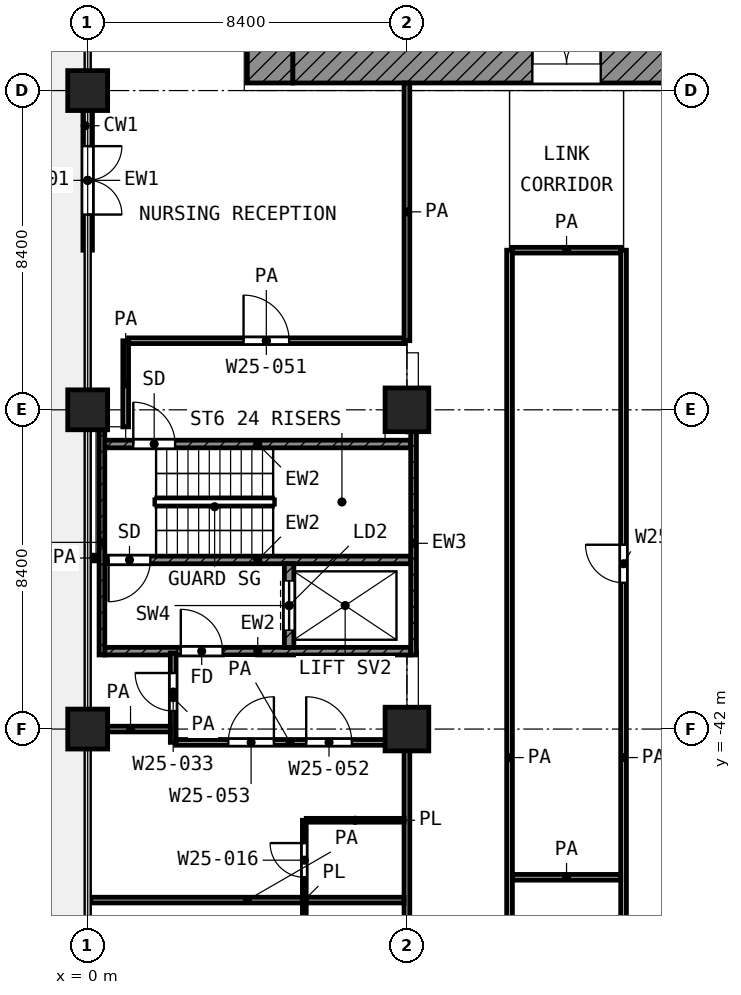
"""IFC4 building model, lengths in metres.
Left out: names, types, materials, properties, quantities, classifications, styles, units other than length and angle.
Written with IfcOpenShell. Run it as: python <this file> out.ifc"""

import sys

from ifc_helpers import new_model, si_unit, direction, frame, frame_2d, origin, origin_2d, place, context, subcontext, project, spatial, rectangle, extrude, element, fill, save


model = new_model("IFC4")
c1 = context("Model", 3, precision=1e-05, world=origin(), true_north=direction((0.0, 1.0)))
c2 = subcontext(c1, "Body", "Model", "MODEL_VIEW")
j1 = project(units=[si_unit("LENGTHUNIT", "METRE"), si_unit("PLANEANGLEUNIT", "RADIAN")], contexts=[c1])
p1 = place(None, origin())
s1 = spatial("IfcSite", under=j1, at=p1, CompositionType="ELEMENT")
p2 = place(p1, origin())
s2 = spatial("IfcBuilding", under=s1, at=p2, CompositionType="ELEMENT")
p3 = place(p2, frame((0.0, 0.0, 132.4)))
s3 = spatial("IfcBuildingStorey", under=s2, at=p3, CompositionType="ELEMENT", Elevation=132.4)
for number, where, z_axis, x_axis in (
    (1, (0.0, -25.2, 0.0), (0.0, 0.0, 1.0), (1.0, 0.0, 0.0)),
    (2, (0.0, -33.6, 0.0), (0.0, 0.0, 1.0), (1.0, 0.0, 0.0)),
):
    element("IfcColumn", number, at=place(p3, frame(where, z_axis=z_axis, x_axis=x_axis)), inside=s3, PredefinedType="COLUMN", context=c2, shape_type="SweptSolid", body=[
        extrude(rectangle(XDim=1.05, YDim=1.05, at=origin_2d()), origin(), (0.0, 0.0, 1.0), 4.2),
    ])
p4 = place(p3, frame((8.4, -33.6, 0.0), z_axis=(0.0, 0.0, 1.0), x_axis=(1.0, 0.0, 0.0)))
e3 = element("IfcColumn", 3, at=p4, inside=s3, PredefinedType="COLUMN", context=c2, shape_type="SweptSolid", body=[
    extrude(rectangle(XDim=1.15, YDim=1.15, at=origin_2d()), origin(), (0.0, 0.0, 1.0), 4.2),
])
p5 = place(p3, frame((0.0, -42.0, 0.0), z_axis=(0.0, 0.0, 1.0), x_axis=(1.0, 0.0, 0.0)))
e4 = element("IfcColumn", 4, at=p5, inside=s3, PredefinedType="COLUMN", context=c2, shape_type="SweptSolid", body=[
    extrude(rectangle(XDim=1.05, YDim=1.05, at=origin_2d()), origin(), (0.0, 0.0, 1.0), 4.2),
])
p6 = place(p3, frame((8.4, -42.0, 0.0), z_axis=(0.0, 0.0, 1.0), x_axis=(1.0, 0.0, 0.0)))
e5 = element("IfcColumn", 5, at=p6, inside=s3, PredefinedType="COLUMN", context=c2, shape_type="SweptSolid", body=[
    extrude(rectangle(XDim=1.15, YDim=1.15, at=origin_2d()), origin(), (0.0, 0.0, 1.0), 4.2),
])
p7 = place(p3, frame((0.0, -25.725, 0.0), z_axis=(0.0, 0.0, 1.0), x_axis=(0.0, -1.0, 0.0)))
e6 = element("IfcWall", 6, at=p7, inside=s3, PredefinedType="SOLIDWALL", context=c2, shape_type="SweptSolid", body=[
    extrude(rectangle(XDim=3.675, YDim=0.25, at=frame_2d((1.837, 0.0))), origin(), (0.0, 0.0, 1.0), 3.48),
])
p8 = place(p7, frame((0.938, 0.0, 0.0)))
e7 = element("IfcOpeningElement", 7, at=p8, cuts=e6, PredefinedType="OPENING", context=c2, shape_type="SweptSolid", body=[
    extrude(rectangle(XDim=1.8, YDim=2.1, at=frame_2d((0.9, 1.05))), frame((0.0, 0.135, 0.0), z_axis=(0.0, -1.0, 0.0), x_axis=(1.0, 0.0, 0.0)), (0.0, 0.0, 1.0), 0.27),
])
p9 = place(p3, frame((4.8, -25.0, 0.0), z_axis=(0.0, 0.0, 1.0), x_axis=(0.0, 1.0, 0.0)))
e8 = element("IfcWall", 8, at=p9, inside=s3, PredefinedType="SHEAR", context=c2, shape_type="SweptSolid", body=[
    extrude(rectangle(XDim=19.6, YDim=1.2, at=frame_2d((9.8, 0.0))), origin(), (0.0, 0.0, 1.0), 3.6),
])
p10 = place(p9, frame((11.45, 0.0, 0.0)))
e9 = element("IfcOpeningElement", 9, at=p10, cuts=e8, PredefinedType="OPENING", context=c2, shape_type="SweptSolid", body=[
    extrude(rectangle(XDim=1.1, YDim=2.1, at=frame_2d((0.55, 1.05))), frame((0.0, 0.61, 0.0), z_axis=(0.0, -1.0, 0.0), x_axis=(1.0, 0.0, 0.0)), (0.0, 0.0, 1.0), 1.22),
])
p11 = place(p9, frame((2.15, 0.0, 0.0)))
e10 = element("IfcOpeningElement", 10, at=p11, cuts=e8, PredefinedType="OPENING", context=c2, shape_type="SweptSolid", body=[
    extrude(rectangle(XDim=1.1, YDim=2.1, at=frame_2d((0.55, 1.05))), frame((0.0, 0.61, 0.0), z_axis=(0.0, -1.0, 0.0), x_axis=(1.0, 0.0, 0.0)), (0.0, 0.0, 1.0), 1.22),
])
p12 = place(p3, frame((5.4, -24.5, 0.0), z_axis=(0.0, 0.0, 1.0), x_axis=(1.0, 0.0, 0.0)))
e11 = element("IfcWall", 11, at=p12, inside=s3, PredefinedType="SHEAR", context=c2, shape_type="SweptSolid", body=[
    extrude(rectangle(XDim=18.6, YDim=1.0, at=frame_2d((9.3, 0.0))), origin(), (0.0, 0.0, 1.0), 3.6),
])
p13 = place(p12, frame((6.3, 0.0, 0.0)))
e12 = element("IfcOpeningElement", 12, at=p13, cuts=e11, PredefinedType="OPENING", context=c2, shape_type="SweptSolid", body=[
    extrude(rectangle(XDim=1.8, YDim=2.1, at=frame_2d((0.9, 1.05))), frame((0.0, 0.51, 0.0), z_axis=(0.0, -1.0, 0.0), x_axis=(1.0, 0.0, 0.0)), (0.0, 0.0, 1.0), 1.02),
])
p14 = place(p3, frame((0.375, -40.05, 0.0), z_axis=(0.0, 0.0, 1.0), x_axis=(0.0, 1.0, 0.0)))
e13 = element("IfcWall", 13, at=p14, inside=s3, PredefinedType="SHEAR", context=c2, shape_type="SweptSolid", body=[
    extrude(rectangle(XDim=5.925, YDim=0.15, at=frame_2d((2.962, 0.0))), origin(), (0.0, 0.0, 1.0), 3.6),
])
p15 = place(p3, frame((8.575, -40.05, 0.0), z_axis=(0.0, 0.0, 1.0), x_axis=(0.0, 1.0, 0.0)))
e14 = element("IfcWall", 14, at=p15, inside=s3, PredefinedType="SHEAR", context=c2, shape_type="SweptSolid", body=[
    extrude(rectangle(XDim=5.875, YDim=0.15, at=frame_2d((2.938, 0.0))), origin(), (0.0, 0.0, 1.0), 3.6),
])
p16 = place(p3, frame((0.45, -34.5, 0.0), z_axis=(0.0, 0.0, 1.0), x_axis=(1.0, 0.0, 0.0)))
e15 = element("IfcWall", 15, at=p16, inside=s3, PredefinedType="SHEAR", context=c2, shape_type="SweptSolid", body=[
    extrude(rectangle(XDim=8.05, YDim=0.2, at=frame_2d((4.025, 0.0))), origin(), (0.0, 0.0, 1.0), 3.6),
])
p17 = place(p16, frame((0.75, 0.0, 0.0)))
e16 = element("IfcOpeningElement", 16, at=p17, cuts=e15, PredefinedType="OPENING", context=c2, shape_type="SweptSolid", body=[
    extrude(rectangle(XDim=1.1, YDim=2.1, at=frame_2d((0.55, 1.05))), frame((0.0, 0.11, 0.0), z_axis=(0.0, -1.0, 0.0), x_axis=(1.0, 0.0, 0.0)), (0.0, 0.0, 1.0), 0.22),
])
p18 = place(p3, frame((0.45, -37.55, 0.0), z_axis=(0.0, 0.0, 1.0), x_axis=(1.0, 0.0, 0.0)))
e17 = element("IfcWall", 17, at=p18, inside=s3, PredefinedType="SHEAR", context=c2, shape_type="SweptSolid", body=[
    extrude(rectangle(XDim=8.05, YDim=0.2, at=frame_2d((4.025, 0.0))), origin(), (0.0, 0.0, 1.0), 3.6),
])
p19 = place(p18, frame((0.1, 0.0, 0.0)))
e18 = element("IfcOpeningElement", 18, at=p19, cuts=e17, PredefinedType="OPENING", context=c2, shape_type="SweptSolid", body=[
    extrude(rectangle(XDim=1.1, YDim=2.1, at=frame_2d((0.55, 1.05))), frame((0.0, 0.11, 0.0), z_axis=(0.0, -1.0, 0.0), x_axis=(1.0, 0.0, 0.0)), (0.0, 0.0, 1.0), 0.22),
])
p20 = place(p3, frame((0.45, -39.95, 0.0), z_axis=(0.0, 0.0, 1.0), x_axis=(1.0, 0.0, 0.0)))
e19 = element("IfcWall", 19, at=p20, inside=s3, PredefinedType="SHEAR", context=c2, shape_type="SweptSolid", body=[
    extrude(rectangle(XDim=8.05, YDim=0.2, at=frame_2d((4.025, 0.0))), origin(), (0.0, 0.0, 1.0), 3.6),
])
p21 = place(p20, frame((2.0, 0.0, 0.0)))
e20 = element("IfcOpeningElement", 20, at=p21, cuts=e19, PredefinedType="OPENING", context=c2, shape_type="SweptSolid", body=[
    extrude(rectangle(XDim=1.1, YDim=2.1, at=frame_2d((0.55, 1.05))), frame((0.0, 0.11, 0.0), z_axis=(0.0, -1.0, 0.0), x_axis=(1.0, 0.0, 0.0)), (0.0, 0.0, 1.0), 0.22),
])
p22 = place(p3, frame((5.3, -39.85, 0.0), z_axis=(0.0, 0.0, 1.0), x_axis=(0.0, 1.0, 0.0)))
e21 = element("IfcWall", 21, at=p22, inside=s3, PredefinedType="SHEAR", context=c2, shape_type="SweptSolid", body=[
    extrude(rectangle(XDim=2.2, YDim=0.25, at=frame_2d((1.1, 0.0))), origin(), (0.0, 0.0, 1.0), 3.6),
])
p23 = place(p22, frame((0.45, 0.0, 0.0)))
e22 = element("IfcOpeningElement", 22, at=p23, cuts=e21, PredefinedType="OPENING", context=c2, shape_type="SweptSolid", body=[
    extrude(rectangle(XDim=1.3, YDim=2.1, at=frame_2d((0.65, 1.05))), frame((0.0, 0.135, 0.0), z_axis=(0.0, -1.0, 0.0), x_axis=(1.0, 0.0, 0.0)), (0.0, 0.0, 1.0), 0.27),
])
p24 = place(p3, frame((5.75, -44.4, 0.0), z_axis=(0.0, 0.0, 1.0), x_axis=(1.0, 0.0, 0.0)))
e23 = element("IfcWall", 23, at=p24, inside=s3, PredefinedType="PARTITIONING", context=c2, shape_type="SweptSolid", body=[
    extrude(rectangle(XDim=2.575, YDim=0.1, at=frame_2d((1.288, 0.0))), origin(), (0.0, 0.0, 1.0), 3.6),
])
p25 = place(p3, frame((5.7, -48.6, 0.0), z_axis=(0.0, 0.0, 1.0), x_axis=(0.0, 1.0, 0.0)))
e24 = element("IfcWall", 24, at=p25, inside=s3, PredefinedType="PARTITIONING", context=c2, shape_type="SweptSolid", body=[
    extrude(rectangle(XDim=4.2, YDim=0.1, at=frame_2d((2.1, 0.0))), origin(), (0.0, 0.0, 1.0), 3.6),
])
p26 = place(p25, frame((2.7, 0.0, 0.0)))
e25 = element("IfcOpeningElement", 25, at=p26, cuts=e24, PredefinedType="OPENING", context=c2, shape_type="SweptSolid", body=[
    extrude(rectangle(XDim=0.9, YDim=2.1, at=frame_2d((0.45, 1.05))), frame((0.0, 0.06, 0.0), z_axis=(0.0, -1.0, 0.0), x_axis=(1.0, 0.0, 0.0)), (0.0, 0.0, 1.0), 0.12),
])
p27 = place(p25, frame((0.6, 0.0, 0.0)))
e26 = element("IfcOpeningElement", 26, at=p27, cuts=e24, PredefinedType="OPENING", context=c2, shape_type="SweptSolid", body=[
    extrude(rectangle(XDim=0.9, YDim=2.1, at=frame_2d((0.45, 1.05))), frame((0.0, 0.06, 0.0), z_axis=(0.0, -1.0, 0.0), x_axis=(1.0, 0.0, 0.0)), (0.0, 0.0, 1.0), 0.12),
])
p28 = place(p3, frame((0.08, -46.5, 0.0), z_axis=(0.0, 0.0, 1.0), x_axis=(1.0, 0.0, 0.0)))
e27 = element("IfcWall", 27, at=p28, inside=s3, PredefinedType="PARTITIONING", context=c2, shape_type="SweptSolid", body=[
    extrude(rectangle(XDim=8.245, YDim=0.15, at=frame_2d((4.123, 0.0))), origin(), (0.0, 0.0, 1.0), 3.6),
])
p29 = place(p3, frame((11.175, -45.9, 0.0), z_axis=(0.0, 0.0, 1.0), x_axis=(1.0, 0.0, 0.0)))
e28 = element("IfcWall", 28, at=p29, inside=s3, PredefinedType="PARTITIONING", context=c2, shape_type="SweptSolid", body=[
    extrude(rectangle(XDim=2.85, YDim=0.15, at=frame_2d((1.425, 0.0))), origin(), (0.0, 0.0, 1.0), 3.6),
])
p30 = place(p3, frame((2.325, -42.35, 0.0), z_axis=(0.0, 0.0, 1.0), x_axis=(1.0, 0.0, 0.0)))
e29 = element("IfcWall", 29, at=p30, inside=s3, PredefinedType="PARTITIONING", context=c2, shape_type="SweptSolid", body=[
    extrude(rectangle(XDim=6.0, YDim=0.15, at=frame_2d((3.0, 0.0))), origin(), (0.0, 0.0, 1.0), 3.6),
])
p31 = place(p30, frame((3.425, 0.0, 0.0)))
e30 = element("IfcOpeningElement", 30, at=p31, cuts=e29, PredefinedType="OPENING", context=c2, shape_type="SweptSolid", body=[
    extrude(rectangle(XDim=1.2, YDim=2.1, at=frame_2d((0.6, 1.05))), frame((0.0, 0.085, 0.0), z_axis=(0.0, -1.0, 0.0), x_axis=(1.0, 0.0, 0.0)), (0.0, 0.0, 1.0), 0.17),
])
p32 = place(p30, frame((1.375, 0.0, 0.0)))
e31 = element("IfcOpeningElement", 31, at=p32, cuts=e29, PredefinedType="OPENING", context=c2, shape_type="SweptSolid", body=[
    extrude(rectangle(XDim=1.2, YDim=2.1, at=frame_2d((0.6, 1.05))), frame((0.0, 0.085, 0.0), z_axis=(0.0, -1.0, 0.0), x_axis=(1.0, 0.0, 0.0)), (0.0, 0.0, 1.0), 0.17),
])
p33 = place(p3, frame((0.08, -42.0, 0.0), z_axis=(0.0, 0.0, 1.0), x_axis=(1.0, 0.0, 0.0)))
e32 = element("IfcWall", 32, at=p33, inside=s3, PredefinedType="PARTITIONING", context=c2, shape_type="SweptSolid", body=[
    extrude(rectangle(XDim=2.095, YDim=0.15, at=frame_2d((1.047, 0.0))), origin(), (0.0, 0.0, 1.0), 3.6),
])
p34 = place(p3, frame((0.08, -37.5, 0.0), z_axis=(0.0, 0.0, 1.0), x_axis=(1.0, 0.0, 0.0)))
e33 = element("IfcWall", 33, at=p34, inside=s3, PredefinedType="PARTITIONING", context=c2, shape_type="SweptSolid", body=[
    extrude(rectangle(XDim=0.19, YDim=0.15, at=frame_2d((0.095, 0.0))), origin(), (0.0, 0.0, 1.0), 3.6),
])
p35 = place(p3, frame((1.076, -31.782, 0.0), z_axis=(0.0, 0.0, 1.0), x_axis=(1.0, 0.0, 0.0)))
e34 = element("IfcWall", 34, at=p35, inside=s3, PredefinedType="PARTITIONING", context=c2, shape_type="SweptSolid", body=[
    extrude(rectangle(XDim=7.249, YDim=0.15, at=frame_2d((3.625, 0.0))), origin(), (0.0, 0.0, 1.0), 3.6),
])
p36 = place(p35, frame((3.025, 0.0, 0.0)))
e35 = element("IfcOpeningElement", 35, at=p36, cuts=e34, PredefinedType="OPENING", context=c2, shape_type="SweptSolid", body=[
    extrude(rectangle(XDim=1.2, YDim=2.1, at=frame_2d((0.6, 1.05))), frame((0.0, 0.085, 0.0), z_axis=(0.0, -1.0, 0.0), x_axis=(1.0, 0.0, 0.0)), (0.0, 0.0, 1.0), 0.17),
])
p37 = place(p3, frame((11.175, -29.4, 0.0), z_axis=(0.0, 0.0, 1.0), x_axis=(1.0, 0.0, 0.0)))
e36 = element("IfcWall", 36, at=p37, inside=s3, PredefinedType="PARTITIONING", context=c2, shape_type="SweptSolid", body=[
    extrude(rectangle(XDim=2.85, YDim=0.15, at=frame_2d((1.425, 0.0))), origin(), (0.0, 0.0, 1.0), 3.6),
])
p38 = place(p3, frame((1.0, -34.048, 0.0), z_axis=(0.0, 0.0, 1.0), x_axis=(0.0, 1.0, 0.0)))
e37 = element("IfcWall", 37, at=p38, inside=s3, PredefinedType="PARTITIONING", context=c2, shape_type="SweptSolid", body=[
    extrude(rectangle(XDim=2.264, YDim=0.15, at=frame_2d((1.132, 0.0))), origin(), (0.0, 0.0, 1.0), 3.6),
])
p39 = place(p3, frame((2.25, -42.35, 0.0), z_axis=(0.0, 0.0, 1.0), x_axis=(0.0, 1.0, 0.0)))
e38 = element("IfcWall", 38, at=p39, inside=s3, PredefinedType="PARTITIONING", context=c2, shape_type="SweptSolid", body=[
    extrude(rectangle(XDim=2.35, YDim=0.15, at=frame_2d((1.175, 0.0))), origin(), (0.0, 0.0, 1.0), 3.6),
])
p40 = place(p39, frame((0.825, 0.0, 0.0)))
e39 = element("IfcOpeningElement", 39, at=p40, cuts=e38, PredefinedType="OPENING", context=c2, shape_type="SweptSolid", body=[
    extrude(rectangle(XDim=1.0, YDim=2.1, at=frame_2d((0.5, 1.05))), frame((0.0, 0.085, 0.0), z_axis=(0.0, -1.0, 0.0), x_axis=(1.0, 0.0, 0.0)), (0.0, 0.0, 1.0), 0.17),
])
p41 = place(p3, frame((8.4, -58.72, 0.0), z_axis=(0.0, 0.0, 1.0), x_axis=(0.0, 1.0, 0.0)))
e40 = element("IfcWall", 40, at=p41, inside=s3, PredefinedType="PARTITIONING", context=c2, shape_type="SweptSolid", body=[
    extrude(rectangle(XDim=16.37, YDim=0.15, at=frame_2d((8.185, 0.0))), origin(), (0.0, 0.0, 1.0), 2.7),
])
p42 = place(p41, frame((8.97, 0.0, 0.0)))
e41 = element("IfcOpeningElement", 41, at=p42, cuts=e40, PredefinedType="OPENING", context=c2, shape_type="SweptSolid", body=[
    extrude(rectangle(XDim=0.9, YDim=2.1, at=frame_2d((0.45, 1.05))), frame((0.0, 0.085, 0.0), z_axis=(0.0, -1.0, 0.0), x_axis=(1.0, 0.0, 0.0)), (0.0, 0.0, 1.0), 0.17),
])
p43 = place(p41, frame((3.37, 0.0, 0.0)))
e42 = element("IfcOpeningElement", 42, at=p43, cuts=e40, PredefinedType="OPENING", context=c2, shape_type="SweptSolid", body=[
    extrude(rectangle(XDim=1.5, YDim=2.1, at=frame_2d((0.75, 1.05))), frame((0.0, 0.085, 0.0), z_axis=(0.0, -1.0, 0.0), x_axis=(1.0, 0.0, 0.0)), (0.0, 0.0, 1.0), 0.17),
])
p44 = place(p3, frame((8.4, -31.782, 0.0), z_axis=(0.0, 0.0, 1.0), x_axis=(0.0, 1.0, 0.0)))
e43 = element("IfcWall", 43, at=p44, inside=s3, PredefinedType="PARTITIONING", context=c2, shape_type="SweptSolid", body=[
    extrude(rectangle(XDim=6.782, YDim=0.15, at=frame_2d((3.391, 0.0))), origin(), (0.0, 0.0, 1.0), 3.6),
])
p45 = place(p3, frame((11.1, -56.1, 0.0), z_axis=(0.0, 0.0, 1.0), x_axis=(0.0, 1.0, 0.0)))
e44 = element("IfcWall", 44, at=p45, inside=s3, PredefinedType="PARTITIONING", context=c2, shape_type="SweptSolid", body=[
    extrude(rectangle(XDim=26.7, YDim=0.15, at=frame_2d((13.35, 0.0))), origin(), (0.0, 0.0, 1.0), 3.6),
])
p46 = place(p3, frame((14.1, -56.1, 0.0), z_axis=(0.0, 0.0, 1.0), x_axis=(0.0, 1.0, 0.0)))
e45 = element("IfcWall", 45, at=p46, inside=s3, PredefinedType="PARTITIONING", context=c2, shape_type="SweptSolid", body=[
    extrude(rectangle(XDim=26.7, YDim=0.15, at=frame_2d((13.35, 0.0))), origin(), (0.0, 0.0, 1.0), 3.6),
])
p47 = place(p46, frame((17.95, 0.0, 0.0)))
e46 = element("IfcOpeningElement", 46, at=p47, cuts=e45, PredefinedType="OPENING", context=c2, shape_type="SweptSolid", body=[
    extrude(rectangle(XDim=1.0, YDim=2.1, at=frame_2d((0.5, 1.05))), frame((0.0, 0.085, 0.0), z_axis=(0.0, -1.0, 0.0), x_axis=(1.0, 0.0, 0.0)), (0.0, 0.0, 1.0), 0.17),
])
p48 = place(p46, frame((4.6, 0.0, 0.0)))
e47 = element("IfcOpeningElement", 47, at=p48, cuts=e45, PredefinedType="OPENING", context=c2, shape_type="SweptSolid", body=[
    extrude(rectangle(XDim=1.0, YDim=2.1, at=frame_2d((0.5, 1.05))), frame((0.0, 0.085, 0.0), z_axis=(0.0, -1.0, 0.0), x_axis=(1.0, 0.0, 0.0)), (0.0, 0.0, 1.0), 0.17),
])
p49 = place(p8, origin())
e48 = element("IfcDoor", 48, at=p49, inside=s3, OperationType="DOUBLE_DOOR_SINGLE_SWING", PredefinedType="DOOR", context=c2, shape_type="SweptSolid", body=[
    extrude(rectangle(XDim=1.8, YDim=2.1, at=frame_2d((0.9, 1.05))), frame((0.0, 0.025, 0.0), z_axis=(0.0, -1.0, 0.0), x_axis=(1.0, 0.0, 0.0)), (0.0, 0.0, 1.0), 0.05),
])
fill(e7, e48)
p50 = place(p13, origin())
e49 = element("IfcDoor", 49, at=p50, inside=s3, OperationType="DOUBLE_DOOR_SINGLE_SWING", PredefinedType="DOOR", context=c2, shape_type="SweptSolid", body=[
    extrude(rectangle(XDim=1.8, YDim=2.1, at=frame_2d((0.9, 1.05))), frame((0.0, 0.025, 0.0), z_axis=(0.0, -1.0, 0.0), x_axis=(1.0, 0.0, 0.0)), (0.0, 0.0, 1.0), 0.05),
])
fill(e12, e49)
p51 = place(p17, origin())
e50 = element("IfcDoor", 50, at=p51, inside=s3, OperationType="SINGLE_SWING_LEFT", PredefinedType="DOOR", context=c2, shape_type="SweptSolid", body=[
    extrude(rectangle(XDim=1.1, YDim=2.1, at=frame_2d((0.55, 1.05))), frame((0.0, 0.025, 0.0), z_axis=(0.0, -1.0, 0.0), x_axis=(1.0, 0.0, 0.0)), (0.0, 0.0, 1.0), 0.05),
])
fill(e16, e50)
p52 = place(p19, frame((1.1, 0.0, 0.0), z_axis=(0.0, 0.0, 1.0), x_axis=(-1.0, 0.0, 0.0)))
e51 = element("IfcDoor", 51, at=p52, inside=s3, OperationType="SINGLE_SWING_LEFT", PredefinedType="DOOR", context=c2, shape_type="SweptSolid", body=[
    extrude(rectangle(XDim=1.1, YDim=2.1, at=frame_2d((0.55, 1.05))), frame((0.0, 0.025, 0.0), z_axis=(0.0, -1.0, 0.0), x_axis=(1.0, 0.0, 0.0)), (0.0, 0.0, 1.0), 0.05),
])
fill(e18, e51)
p53 = place(p23, origin())
e52 = element("IfcDoor", 52, at=p53, inside=s3, OperationType="DOUBLE_DOOR_SLIDING", PredefinedType="DOOR", context=c2, shape_type="SweptSolid", body=[
    extrude(rectangle(XDim=1.3, YDim=2.1, at=frame_2d((0.65, 1.05))), frame((0.0, 0.025, 0.0), z_axis=(0.0, -1.0, 0.0), x_axis=(1.0, 0.0, 0.0)), (0.0, 0.0, 1.0), 0.05),
])
fill(e22, e52)
p54 = place(p21, origin())
e53 = element("IfcDoor", 53, at=p54, inside=s3, OperationType="SINGLE_SWING_LEFT", PredefinedType="DOOR", context=c2, shape_type="SweptSolid", body=[
    extrude(rectangle(XDim=1.1, YDim=2.1, at=frame_2d((0.55, 1.05))), frame((0.0, 0.025, 0.0), z_axis=(0.0, -1.0, 0.0), x_axis=(1.0, 0.0, 0.0)), (0.0, 0.0, 1.0), 0.05),
])
fill(e20, e53)
p55 = place(p36, origin())
e54 = element("IfcDoor", 54, at=p55, inside=s3, OperationType="SINGLE_SWING_LEFT", PredefinedType="DOOR", context=c2, shape_type="SweptSolid", body=[
    extrude(rectangle(XDim=1.2, YDim=2.1, at=frame_2d((0.6, 1.05))), frame((0.0, 0.025, 0.0), z_axis=(0.0, -1.0, 0.0), x_axis=(1.0, 0.0, 0.0)), (0.0, 0.0, 1.0), 0.05),
])
fill(e35, e54)
p56 = place(p40, origin())
e55 = element("IfcDoor", 55, at=p56, inside=s3, OperationType="SINGLE_SWING_RIGHT", PredefinedType="DOOR", context=c2, shape_type="SweptSolid", body=[
    extrude(rectangle(XDim=1.0, YDim=2.1, at=frame_2d((0.5, 1.05))), frame((0.0, 0.025, 0.0), z_axis=(0.0, -1.0, 0.0), x_axis=(1.0, 0.0, 0.0)), (0.0, 0.0, 1.0), 0.05),
])
fill(e39, e55)
p57 = place(p31, origin())
e56 = element("IfcDoor", 56, at=p57, inside=s3, OperationType="SINGLE_SWING_LEFT", PredefinedType="DOOR", context=c2, shape_type="SweptSolid", body=[
    extrude(rectangle(XDim=1.2, YDim=2.1, at=frame_2d((0.6, 1.05))), frame((0.0, 0.025, 0.0), z_axis=(0.0, -1.0, 0.0), x_axis=(1.0, 0.0, 0.0)), (0.0, 0.0, 1.0), 0.05),
])
fill(e30, e56)
p58 = place(p32, origin())
e57 = element("IfcDoor", 57, at=p58, inside=s3, OperationType="SINGLE_SWING_RIGHT", PredefinedType="DOOR", context=c2, shape_type="SweptSolid", body=[
    extrude(rectangle(XDim=1.2, YDim=2.1, at=frame_2d((0.6, 1.05))), frame((0.0, 0.025, 0.0), z_axis=(0.0, -1.0, 0.0), x_axis=(1.0, 0.0, 0.0)), (0.0, 0.0, 1.0), 0.05),
])
fill(e31, e57)
p59 = place(p26, origin())
e58 = element("IfcDoor", 58, at=p59, inside=s3, OperationType="SINGLE_SWING_RIGHT", PredefinedType="DOOR", context=c2, shape_type="SweptSolid", body=[
    extrude(rectangle(XDim=0.9, YDim=2.1, at=frame_2d((0.45, 1.05))), frame((0.0, 0.025, 0.0), z_axis=(0.0, -1.0, 0.0), x_axis=(1.0, 0.0, 0.0)), (0.0, 0.0, 1.0), 0.05),
])
fill(e25, e58)
p60 = place(p47, origin())
e59 = element("IfcDoor", 59, at=p60, inside=s3, OperationType="SINGLE_SWING_RIGHT", PredefinedType="DOOR", context=c2, shape_type="SweptSolid", body=[
    extrude(rectangle(XDim=1.0, YDim=2.1, at=frame_2d((0.5, 1.05))), frame((0.0, 0.025, 0.0), z_axis=(0.0, -1.0, 0.0), x_axis=(1.0, 0.0, 0.0)), (0.0, 0.0, 1.0), 0.05),
])
fill(e46, e59)
save(model, sys.argv[1])
